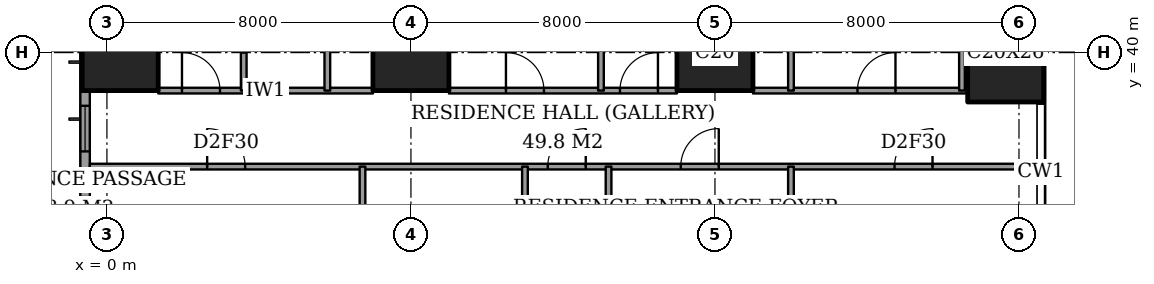
"""IFC4 building model, lengths in metres.
Left out: names, types, materials, properties, quantities, classifications, styles, units other than length and angle.
Written with IfcOpenShell. Run it as: python <this file> out.ifc"""

import sys

from ifc_helpers import new_model, si_unit, direction, frame, frame_2d, origin, origin_2d, place, context, subcontext, project, spatial, rectangle, extrude, element, fill, save


model = new_model("IFC4")
c1 = context("Model", 3, precision=1e-05, world=origin(), true_north=direction((0.0, 1.0)))
c2 = subcontext(c1, "Body", "Model", "MODEL_VIEW")
j1 = project(units=[si_unit("LENGTHUNIT", "METRE"), si_unit("PLANEANGLEUNIT", "RADIAN")], contexts=[c1])
p1 = place(None, origin())
s1 = spatial("IfcSite", under=j1, at=p1, CompositionType="ELEMENT")
p2 = place(p1, origin())
s2 = spatial("IfcBuilding", under=s1, at=p2, CompositionType="ELEMENT")
p3 = place(p2, frame((0.0, 0.0, 29.6)))
s3 = spatial("IfcBuildingStorey", under=s2, at=p3, CompositionType="ELEMENT", Elevation=29.6)
for number, where, z_axis, x_axis in (
    (1, (0.35, 40.0, 0.0), (0.0, 0.0, 1.0), (1.0, 0.0, 0.0)),
    (2, (8.0, 40.0, 0.0), (0.0, 0.0, 1.0), (1.0, 0.0, 0.0)),
    (3, (16.0, 40.0, 0.0), (0.0, 0.0, 1.0), (1.0, 0.0, 0.0)),
):
    element("IfcColumn", number, at=place(p3, frame(where, z_axis=z_axis, x_axis=x_axis)), inside=s3, PredefinedType="COLUMN", context=c2, shape_type="SweptSolid", body=[
        extrude(rectangle(XDim=2.0, YDim=2.0, at=origin_2d()), origin(), (0.0, 0.0, 1.0), 3.6),
    ])
p4 = place(p3, frame((23.65, 40.0, 0.0), z_axis=(0.0, 0.0, 1.0), x_axis=(1.0, 0.0, 0.0)))
e4 = element("IfcColumn", 4, at=p4, inside=s3, PredefinedType="COLUMN", context=c2, shape_type="SweptSolid", body=[
    extrude(rectangle(XDim=2.0, YDim=2.6, at=origin_2d()), origin(), (0.0, 0.0, 1.0), 3.6),
])
p5 = place(p3, frame((-0.575, 44.825, 0.0), z_axis=(0.0, 0.0, 1.0), x_axis=(0.0, -1.0, 0.0)))
e5 = element("IfcWall", 5, at=p5, inside=s3, PredefinedType="SOLIDWALL", context=c2, shape_type="SweptSolid", body=[
    extrude(rectangle(XDim=41.65, YDim=0.25, at=frame_2d((20.825, 0.0))), origin(), (0.0, 0.0, 1.0), 3.6),
])
p6 = place(p5, frame((0.775, 0.0, 0.6)))
e6 = element("IfcOpeningElement", 6, at=p6, cuts=e5, PredefinedType="OPENING", context=c2, shape_type="SweptSolid", body=[
    extrude(rectangle(XDim=2.4, YDim=2.0, at=frame_2d((1.2, 1.0))), frame((0.0, 0.135, 0.0), z_axis=(0.0, -1.0, 0.0), x_axis=(1.0, 0.0, 0.0)), (0.0, 0.0, 1.0), 0.27),
])
p7 = place(p5, frame((6.225, 0.0, 0.6)))
e7 = element("IfcOpeningElement", 7, at=p7, cuts=e5, PredefinedType="OPENING", context=c2, shape_type="SweptSolid", body=[
    extrude(rectangle(XDim=1.2, YDim=2.0, at=frame_2d((0.6, 1.0))), frame((0.0, 0.135, 0.0), z_axis=(0.0, -1.0, 0.0), x_axis=(1.0, 0.0, 0.0)), (0.0, 0.0, 1.0), 0.27),
])
p8 = place(p5, frame((8.625, 0.0, 0.6)))
e8 = element("IfcOpeningElement", 8, at=p8, cuts=e5, PredefinedType="OPENING", context=c2, shape_type="SweptSolid", body=[
    extrude(rectangle(XDim=2.4, YDim=2.0, at=frame_2d((1.2, 1.0))), frame((0.0, 0.135, 0.0), z_axis=(0.0, -1.0, 0.0), x_axis=(1.0, 0.0, 0.0)), (0.0, 0.0, 1.0), 0.27),
])
p9 = place(p5, frame((15.625, 0.0, 0.6)))
e9 = element("IfcOpeningElement", 9, at=p9, cuts=e5, PredefinedType="OPENING", context=c2, shape_type="SweptSolid", body=[
    extrude(rectangle(XDim=2.4, YDim=2.0, at=frame_2d((1.2, 1.0))), frame((0.0, 0.135, 0.0), z_axis=(0.0, -1.0, 0.0), x_axis=(1.0, 0.0, 0.0)), (0.0, 0.0, 1.0), 0.27),
])
p10 = place(p5, frame((23.625, 0.0, 0.6)))
e10 = element("IfcOpeningElement", 10, at=p10, cuts=e5, PredefinedType="OPENING", context=c2, shape_type="SweptSolid", body=[
    extrude(rectangle(XDim=2.4, YDim=2.0, at=frame_2d((1.2, 1.0))), frame((0.0, 0.135, 0.0), z_axis=(0.0, -1.0, 0.0), x_axis=(1.0, 0.0, 0.0)), (0.0, 0.0, 1.0), 0.27),
])
p11 = place(p5, frame((30.825, 0.0, 0.6)))
e11 = element("IfcOpeningElement", 11, at=p11, cuts=e5, PredefinedType="OPENING", context=c2, shape_type="SweptSolid", body=[
    extrude(rectangle(XDim=2.4, YDim=2.0, at=frame_2d((1.2, 1.0))), frame((0.0, 0.135, 0.0), z_axis=(0.0, -1.0, 0.0), x_axis=(1.0, 0.0, 0.0)), (0.0, 0.0, 1.0), 0.27),
])
p12 = place(p5, frame((34.5, 0.0, 0.6)))
e12 = element("IfcOpeningElement", 12, at=p12, cuts=e5, PredefinedType="OPENING", context=c2, shape_type="SweptSolid", body=[
    extrude(rectangle(XDim=1.2, YDim=2.0, at=frame_2d((0.6, 1.0))), frame((0.0, 0.135, 0.0), z_axis=(0.0, -1.0, 0.0), x_axis=(1.0, 0.0, 0.0)), (0.0, 0.0, 1.0), 0.27),
])
p13 = place(p5, frame((38.475, 0.0, 0.6)))
e13 = element("IfcOpeningElement", 13, at=p13, cuts=e5, PredefinedType="OPENING", context=c2, shape_type="SweptSolid", body=[
    extrude(rectangle(XDim=2.4, YDim=2.0, at=frame_2d((1.2, 1.0))), frame((0.0, 0.135, 0.0), z_axis=(0.0, -1.0, 0.0), x_axis=(1.0, 0.0, 0.0)), (0.0, 0.0, 1.0), 0.27),
])
p14 = place(p3, frame((-0.45, 37.0, 0.0), z_axis=(0.0, 0.0, 1.0), x_axis=(1.0, 0.0, 0.0)))
e14 = element("IfcWall", 14, at=p14, inside=s3, PredefinedType="PARTITIONING", context=c2, shape_type="SweptSolid", body=[
    extrude(rectangle(XDim=25.011, YDim=0.15, at=frame_2d((12.505, 0.0))), origin(), (0.0, 0.0, 1.0), 3.35),
])
p15 = place(p14, frame((12.05, 0.0, 0.0)))
e15 = element("IfcOpeningElement", 15, at=p15, cuts=e14, PredefinedType="OPENING", context=c2, shape_type="SweptSolid", body=[
    extrude(rectangle(XDim=1.0, YDim=2.1, at=frame_2d((0.5, 1.05))), frame((0.0, 0.085, 0.0), z_axis=(0.0, -1.0, 0.0), x_axis=(1.0, 0.0, 0.0)), (0.0, 0.0, 1.0), 0.17),
])
p16 = place(p14, frame((3.087, 0.0, 0.0)))
e16 = element("IfcOpeningElement", 16, at=p16, cuts=e14, PredefinedType="OPENING", context=c2, shape_type="SweptSolid", body=[
    extrude(rectangle(XDim=1.0, YDim=2.1, at=frame_2d((0.5, 1.05))), frame((0.0, 0.085, 0.0), z_axis=(0.0, -1.0, 0.0), x_axis=(1.0, 0.0, 0.0)), (0.0, 0.0, 1.0), 0.17),
])
p17 = place(p14, frame((15.55, 0.0, 0.0)))
e17 = element("IfcOpeningElement", 17, at=p17, cuts=e14, PredefinedType="OPENING", context=c2, shape_type="SweptSolid", body=[
    extrude(rectangle(XDim=1.0, YDim=2.1, at=frame_2d((0.5, 1.05))), frame((0.0, 0.085, 0.0), z_axis=(0.0, -1.0, 0.0), x_axis=(1.0, 0.0, 0.0)), (0.0, 0.0, 1.0), 0.17),
])
p18 = place(p14, frame((21.175, 0.0, 0.0)))
e18 = element("IfcOpeningElement", 18, at=p18, cuts=e14, PredefinedType="OPENING", context=c2, shape_type="SweptSolid", body=[
    extrude(rectangle(XDim=1.0, YDim=2.1, at=frame_2d((0.5, 1.05))), frame((0.0, 0.085, 0.0), z_axis=(0.0, -1.0, 0.0), x_axis=(1.0, 0.0, 0.0)), (0.0, 0.0, 1.0), 0.17),
])
p19 = place(p3, frame((1.35, 39.0, 0.0), z_axis=(0.0, 0.0, 1.0), x_axis=(1.0, 0.0, 0.0)))
e19 = element("IfcWall", 19, at=p19, inside=s3, PredefinedType="PARTITIONING", context=c2, shape_type="SweptSolid", body=[
    extrude(rectangle(XDim=5.65, YDim=0.15, at=frame_2d((2.825, 0.0))), origin(), (0.0, 0.0, 1.0), 3.35),
])
p20 = place(p19, frame((0.625, 0.0, 0.0)))
e20 = element("IfcOpeningElement", 20, at=p20, cuts=e19, PredefinedType="OPENING", context=c2, shape_type="SweptSolid", body=[
    extrude(rectangle(XDim=1.0, YDim=2.1, at=frame_2d((0.5, 1.05))), frame((0.0, 0.085, 0.0), z_axis=(0.0, -1.0, 0.0), x_axis=(1.0, 0.0, 0.0)), (0.0, 0.0, 1.0), 0.17),
])
p21 = place(p3, frame((9.0, 39.0, 0.0), z_axis=(0.0, 0.0, 1.0), x_axis=(1.0, 0.0, 0.0)))
e21 = element("IfcWall", 21, at=p21, inside=s3, PredefinedType="PARTITIONING", context=c2, shape_type="SweptSolid", body=[
    extrude(rectangle(XDim=6.0, YDim=0.15, at=frame_2d((3.0, 0.0))), origin(), (0.0, 0.0, 1.0), 3.35),
])
p22 = place(p21, frame((1.5, 0.0, 0.0)))
e22 = element("IfcOpeningElement", 22, at=p22, cuts=e21, PredefinedType="OPENING", context=c2, shape_type="SweptSolid", body=[
    extrude(rectangle(XDim=1.0, YDim=2.1, at=frame_2d((0.5, 1.05))), frame((0.0, 0.085, 0.0), z_axis=(0.0, -1.0, 0.0), x_axis=(1.0, 0.0, 0.0)), (0.0, 0.0, 1.0), 0.17),
])
p23 = place(p21, frame((4.5, 0.0, 0.0)))
e23 = element("IfcOpeningElement", 23, at=p23, cuts=e21, PredefinedType="OPENING", context=c2, shape_type="SweptSolid", body=[
    extrude(rectangle(XDim=1.0, YDim=2.1, at=frame_2d((0.5, 1.05))), frame((0.0, 0.085, 0.0), z_axis=(0.0, -1.0, 0.0), x_axis=(1.0, 0.0, 0.0)), (0.0, 0.0, 1.0), 0.17),
])
p24 = place(p3, frame((17.0, 39.0, 0.0), z_axis=(0.0, 0.0, 1.0), x_axis=(1.0, 0.0, 0.0)))
e24 = element("IfcWall", 24, at=p24, inside=s3, PredefinedType="PARTITIONING", context=c2, shape_type="SweptSolid", body=[
    extrude(rectangle(XDim=5.65, YDim=0.15, at=frame_2d((2.825, 0.0))), origin(), (0.0, 0.0, 1.0), 3.35),
])
p25 = place(p24, frame((2.75, 0.0, 0.0)))
e25 = element("IfcOpeningElement", 25, at=p25, cuts=e24, PredefinedType="OPENING", context=c2, shape_type="SweptSolid", body=[
    extrude(rectangle(XDim=1.0, YDim=2.1, at=frame_2d((0.5, 1.05))), frame((0.0, 0.085, 0.0), z_axis=(0.0, -1.0, 0.0), x_axis=(1.0, 0.0, 0.0)), (0.0, 0.0, 1.0), 0.17),
])
p26 = place(p3, frame((3.6, 39.0, 0.0), z_axis=(0.0, 0.0, 1.0), x_axis=(0.0, 1.0, 0.0)))
e26 = element("IfcWall", 26, at=p26, inside=s3, PredefinedType="PARTITIONING", context=c2, shape_type="SweptSolid", body=[
    extrude(rectangle(XDim=2.9, YDim=0.15, at=frame_2d((1.45, 0.0))), origin(), (0.0, 0.0, 1.0), 3.35),
])
p27 = place(p26, frame((1.0, 0.0, 0.0)))
e27 = element("IfcOpeningElement", 27, at=p27, cuts=e26, PredefinedType="OPENING", context=c2, shape_type="SweptSolid", body=[
    extrude(rectangle(XDim=0.9, YDim=2.1, at=frame_2d((0.45, 1.05))), frame((0.0, 0.085, 0.0), z_axis=(0.0, -1.0, 0.0), x_axis=(1.0, 0.0, 0.0)), (0.0, 0.0, 1.0), 0.17),
])
p28 = place(p3, frame((5.8, 39.0, 0.0), z_axis=(0.0, 0.0, 1.0), x_axis=(0.0, 1.0, 0.0)))
e28 = element("IfcWall", 28, at=p28, inside=s3, PredefinedType="PARTITIONING", context=c2, shape_type="SweptSolid", body=[
    extrude(rectangle(XDim=9.45, YDim=0.15, at=frame_2d((4.725, 0.0))), origin(), (0.0, 0.0, 1.0), 3.35),
])
p29 = place(p3, frame((6.725, 33.2, 0.0), z_axis=(0.0, 0.0, 1.0), x_axis=(0.0, 1.0, 0.0)))
e29 = element("IfcWall", 29, at=p29, inside=s3, PredefinedType="PARTITIONING", context=c2, shape_type="SweptSolid", body=[
    extrude(rectangle(XDim=3.8, YDim=0.15, at=frame_2d((1.9, 0.0))), origin(), (0.0, 0.0, 1.0), 3.35),
])
p30 = place(p29, frame((1.75, 0.0, 0.0)))
e30 = element("IfcOpeningElement", 30, at=p30, cuts=e29, PredefinedType="OPENING", context=c2, shape_type="SweptSolid", body=[
    extrude(rectangle(XDim=0.9, YDim=2.1, at=frame_2d((0.45, 1.05))), frame((0.0, 0.085, 0.0), z_axis=(0.0, -1.0, 0.0), x_axis=(1.0, 0.0, 0.0)), (0.0, 0.0, 1.0), 0.17),
])
p31 = place(p3, frame((11.0, 28.0, 0.0), z_axis=(0.0, 0.0, 1.0), x_axis=(0.0, 1.0, 0.0)))
e31 = element("IfcWall", 31, at=p31, inside=s3, PredefinedType="PARTITIONING", context=c2, shape_type="SweptSolid", body=[
    extrude(rectangle(XDim=9.0, YDim=0.15, at=frame_2d((4.5, 0.0))), origin(), (0.0, 0.0, 1.0), 3.35),
])
p32 = place(p31, frame((0.837, 0.0, 0.0)))
e32 = element("IfcOpeningElement", 32, at=p32, cuts=e31, PredefinedType="OPENING", context=c2, shape_type="SweptSolid", body=[
    extrude(rectangle(XDim=1.0, YDim=2.1, at=frame_2d((0.5, 1.05))), frame((0.0, 0.085, 0.0), z_axis=(0.0, -1.0, 0.0), x_axis=(1.0, 0.0, 0.0)), (0.0, 0.0, 1.0), 0.17),
])
p33 = place(p3, frame((13.0, 39.0, 0.0), z_axis=(0.0, 0.0, 1.0), x_axis=(0.0, 1.0, 0.0)))
e33 = element("IfcWall", 33, at=p33, inside=s3, PredefinedType="PARTITIONING", context=c2, shape_type="SweptSolid", body=[
    extrude(rectangle(XDim=9.45, YDim=0.15, at=frame_2d((4.725, 0.0))), origin(), (0.0, 0.0, 1.0), 3.35),
])
p34 = place(p3, frame((13.2, 30.675, 0.0), z_axis=(0.0, 0.0, 1.0), x_axis=(0.0, 1.0, 0.0)))
e34 = element("IfcWall", 34, at=p34, inside=s3, PredefinedType="PARTITIONING", context=c2, shape_type="SweptSolid", body=[
    extrude(rectangle(XDim=6.325, YDim=0.15, at=frame_2d((3.163, 0.0))), origin(), (0.0, 0.0, 1.0), 3.35),
])
p35 = place(p3, frame((18.0, 33.0, 0.0), z_axis=(0.0, 0.0, 1.0), x_axis=(0.0, 1.0, 0.0)))
e35 = element("IfcWall", 35, at=p35, inside=s3, PredefinedType="PARTITIONING", context=c2, shape_type="SweptSolid", body=[
    extrude(rectangle(XDim=4.0, YDim=0.15, at=frame_2d((2.0, 0.0))), origin(), (0.0, 0.0, 1.0), 3.35),
])
p36 = place(p3, frame((18.0, 39.0, 0.0), z_axis=(0.0, 0.0, 1.0), x_axis=(0.0, 1.0, 0.0)))
e36 = element("IfcWall", 36, at=p36, inside=s3, PredefinedType="PARTITIONING", context=c2, shape_type="SweptSolid", body=[
    extrude(rectangle(XDim=9.45, YDim=0.15, at=frame_2d((4.725, 0.0))), origin(), (0.0, 0.0, 1.0), 3.35),
])
p37 = place(p3, frame((22.5, 39.0, 0.0), z_axis=(0.0, 0.0, 1.0), x_axis=(0.0, 1.0, 0.0)))
e37 = element("IfcWall", 37, at=p37, inside=s3, PredefinedType="PARTITIONING", context=c2, shape_type="SweptSolid", body=[
    extrude(rectangle(XDim=9.45, YDim=0.15, at=frame_2d((4.725, 0.0))), origin(), (0.0, 0.0, 1.0), 3.35),
])
p38 = place(p37, frame((4.275, 0.0, 0.0)))
e38 = element("IfcOpeningElement", 38, at=p38, cuts=e37, PredefinedType="OPENING", context=c2, shape_type="SweptSolid", body=[
    extrude(rectangle(XDim=0.9, YDim=2.1, at=frame_2d((0.45, 1.05))), frame((0.0, 0.085, 0.0), z_axis=(0.0, -1.0, 0.0), x_axis=(1.0, 0.0, 0.0)), (0.0, 0.0, 1.0), 0.17),
])
p39 = place(p7, origin())
e39 = element("IfcWindow", 39, at=p39, inside=s3, PartitioningType="SINGLE_PANEL", PredefinedType="WINDOW", context=c2, shape_type="SweptSolid", body=[
    extrude(rectangle(XDim=1.2, YDim=2.0, at=frame_2d((0.6, 1.0))), frame((0.0, 0.03, 0.0), z_axis=(0.0, -1.0, 0.0), x_axis=(1.0, 0.0, 0.0)), (0.0, 0.0, 1.0), 0.06),
])
fill(e7, e39)
p40 = place(p8, origin())
e40 = element("IfcWindow", 40, at=p40, inside=s3, PartitioningType="SINGLE_PANEL", PredefinedType="WINDOW", context=c2, shape_type="SweptSolid", body=[
    extrude(rectangle(XDim=2.4, YDim=2.0, at=frame_2d((1.2, 1.0))), frame((0.0, 0.03, 0.0), z_axis=(0.0, -1.0, 0.0), x_axis=(1.0, 0.0, 0.0)), (0.0, 0.0, 1.0), 0.06),
])
fill(e8, e40)
p41 = place(p20, origin())
e41 = element("IfcDoor", 41, at=p41, inside=s3, OperationType="SINGLE_SWING_RIGHT", PredefinedType="DOOR", context=c2, shape_type="SweptSolid", body=[
    extrude(rectangle(XDim=1.0, YDim=2.1, at=frame_2d((0.5, 1.05))), frame((0.0, 0.025, 0.0), z_axis=(0.0, -1.0, 0.0), x_axis=(1.0, 0.0, 0.0)), (0.0, 0.0, 1.0), 0.05),
])
fill(e20, e41)
p42 = place(p22, origin())
e42 = element("IfcDoor", 42, at=p42, inside=s3, OperationType="SINGLE_SWING_RIGHT", PredefinedType="DOOR", context=c2, shape_type="SweptSolid", body=[
    extrude(rectangle(XDim=1.0, YDim=2.1, at=frame_2d((0.5, 1.05))), frame((0.0, 0.025, 0.0), z_axis=(0.0, -1.0, 0.0), x_axis=(1.0, 0.0, 0.0)), (0.0, 0.0, 1.0), 0.05),
])
fill(e22, e42)
p43 = place(p23, origin())
e43 = element("IfcDoor", 43, at=p43, inside=s3, OperationType="SINGLE_SWING_LEFT", PredefinedType="DOOR", context=c2, shape_type="SweptSolid", body=[
    extrude(rectangle(XDim=1.0, YDim=2.1, at=frame_2d((0.5, 1.05))), frame((0.0, 0.025, 0.0), z_axis=(0.0, -1.0, 0.0), x_axis=(1.0, 0.0, 0.0)), (0.0, 0.0, 1.0), 0.05),
])
fill(e23, e43)
p44 = place(p25, origin())
e44 = element("IfcDoor", 44, at=p44, inside=s3, OperationType="SINGLE_SWING_LEFT", PredefinedType="DOOR", context=c2, shape_type="SweptSolid", body=[
    extrude(rectangle(XDim=1.0, YDim=2.1, at=frame_2d((0.5, 1.05))), frame((0.0, 0.025, 0.0), z_axis=(0.0, -1.0, 0.0), x_axis=(1.0, 0.0, 0.0)), (0.0, 0.0, 1.0), 0.05),
])
fill(e25, e44)
p45 = place(p15, origin())
e45 = element("IfcDoor", 45, at=p45, inside=s3, OperationType="SINGLE_SWING_LEFT", PredefinedType="DOOR", context=c2, shape_type="SweptSolid", body=[
    extrude(rectangle(XDim=1.0, YDim=2.1, at=frame_2d((0.5, 1.05))), frame((0.0, 0.025, 0.0), z_axis=(0.0, -1.0, 0.0), x_axis=(1.0, 0.0, 0.0)), (0.0, 0.0, 1.0), 0.05),
])
fill(e15, e45)
p46 = place(p16, origin())
e46 = element("IfcDoor", 46, at=p46, inside=s3, OperationType="SINGLE_SWING_RIGHT", PredefinedType="DOOR", context=c2, shape_type="SweptSolid", body=[
    extrude(rectangle(XDim=1.0, YDim=2.1, at=frame_2d((0.5, 1.05))), frame((0.0, 0.025, 0.0), z_axis=(0.0, -1.0, 0.0), x_axis=(1.0, 0.0, 0.0)), (0.0, 0.0, 1.0), 0.05),
])
fill(e16, e46)
p47 = place(p17, origin())
e47 = element("IfcDoor", 47, at=p47, inside=s3, OperationType="SINGLE_SWING_LEFT", PredefinedType="DOOR", context=c2, shape_type="SweptSolid", body=[
    extrude(rectangle(XDim=1.0, YDim=2.1, at=frame_2d((0.5, 1.05))), frame((0.0, 0.025, 0.0), z_axis=(0.0, -1.0, 0.0), x_axis=(1.0, 0.0, 0.0)), (0.0, 0.0, 1.0), 0.05),
])
fill(e17, e47)
p48 = place(p18, origin())
e48 = element("IfcDoor", 48, at=p48, inside=s3, OperationType="SINGLE_SWING_LEFT", PredefinedType="DOOR", context=c2, shape_type="SweptSolid", body=[
    extrude(rectangle(XDim=1.0, YDim=2.1, at=frame_2d((0.5, 1.05))), frame((0.0, 0.025, 0.0), z_axis=(0.0, -1.0, 0.0), x_axis=(1.0, 0.0, 0.0)), (0.0, 0.0, 1.0), 0.05),
])
fill(e18, e48)
save(model, sys.argv[1])
